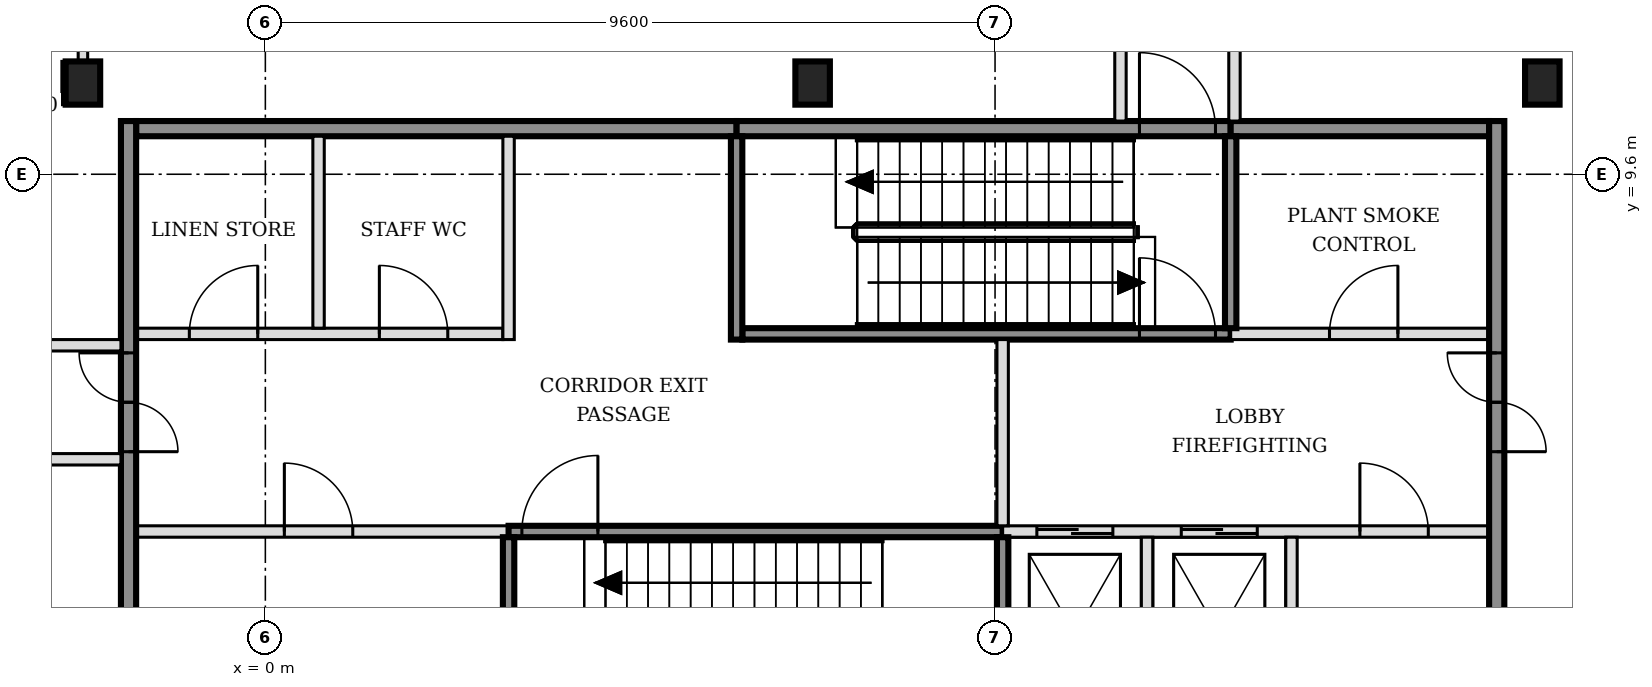
"""IFC4 building model, lengths in metres.
Left out: names, types, materials, properties, quantities, classifications, styles, units other than length and angle.
Written with IfcOpenShell. Run it as: python <this file> out.ifc"""

import sys

from ifc_helpers import new_model, si_unit, direction, frame, frame_2d, origin, origin_2d, place, context, subcontext, project, spatial, polyline, rectangle, i_section, outline, extrude, element, fill, save


model = new_model("IFC4")
c1 = context("Model", 3, precision=1e-05, world=origin(), true_north=direction((0.0, 1.0)))
c2 = subcontext(c1, "Body", "Model", "MODEL_VIEW")
j1 = project(units=[si_unit("LENGTHUNIT", "METRE"), si_unit("PLANEANGLEUNIT", "RADIAN")], contexts=[c1])
p1 = place(None, origin())
s1 = spatial("IfcSite", under=j1, at=p1, CompositionType="ELEMENT")
p2 = place(p1, origin())
s2 = spatial("IfcBuilding", under=s1, at=p2, CompositionType="ELEMENT")
p3 = place(p2, origin())
s3 = spatial("IfcBuildingStorey", under=s2, at=p3, CompositionType="ELEMENT", Elevation=0.0)
for number, where, z_axis, x_axis in (
    (1, (-2.4, 10.8, -0.25), (0.0, 0.0, 1.0), (1.0, 0.0, 0.0)),
    (2, (7.2, 10.8, -0.25), (0.0, 0.0, 1.0), (1.0, 0.0, 0.0)),
    (3, (16.8, 10.8, -0.25), (0.0, 0.0, 1.0), (1.0, 0.0, 0.0)),
):
    element("IfcColumn", number, at=place(p3, frame(where, z_axis=z_axis, x_axis=x_axis)), inside=s3, PredefinedType="COLUMN", context=c2, shape_type="SweptSolid", body=[
        extrude(i_section(OverallWidth=0.454, OverallDepth=0.569, WebThickness=0.078, FlangeThickness=0.125, FilletRadius=0.015, at=origin_2d()), origin(), (0.0, 0.0, 1.0), 9.05),
    ])
p4 = place(p3, frame((-1.7, 4.9, 0.0), z_axis=(0.0, 0.0, 1.0), x_axis=(1.0, 0.0, 0.0)))
e4 = element("IfcWall", 4, at=p4, inside=s3, PredefinedType="SOLIDWALL", context=c2, shape_type="SweptSolid", body=[
    extrude(rectangle(XDim=4.9, YDim=0.15, at=frame_2d((2.45, 0.0))), origin(), (0.0, 0.0, 1.0), 8.8),
])
p5 = place(p4, frame((1.95, 0.0, 0.0)))
e5 = element("IfcOpeningElement", 5, at=p5, cuts=e4, PredefinedType="OPENING", context=c2, shape_type="SweptSolid", body=[
    extrude(rectangle(XDim=0.9, YDim=2.1, at=frame_2d((0.45, 1.05))), frame((0.0, 0.085, 0.0), z_axis=(0.0, -1.0, 0.0), x_axis=(1.0, 0.0, 0.0)), (0.0, 0.0, 1.0), 0.17),
])
p6 = place(p3, frame((3.2, 4.9, 0.0), z_axis=(0.0, 0.0, 1.0), x_axis=(1.0, 0.0, 0.0)))
e6 = element("IfcWall", 6, at=p6, inside=s3, PredefinedType="SOLIDWALL", context=c2, shape_type="SweptSolid", body=[
    extrude(rectangle(XDim=6.5, YDim=0.15, at=frame_2d((3.25, 0.0))), origin(), (0.0, 0.0, 1.0), 8.8),
])
p7 = place(p6, frame((0.175, 0.0, 0.0)))
e7 = element("IfcOpeningElement", 7, at=p7, cuts=e6, PredefinedType="OPENING", context=c2, shape_type="SweptSolid", body=[
    extrude(rectangle(XDim=1.0, YDim=2.1, at=frame_2d((0.5, 1.05))), frame((0.0, 0.085, 0.0), z_axis=(0.0, -1.0, 0.0), x_axis=(1.0, 0.0, 0.0)), (0.0, 0.0, 1.0), 0.17),
])
p8 = place(p3, frame((9.7, 4.9, 0.0), z_axis=(0.0, 0.0, 1.0), x_axis=(1.0, 0.0, 0.0)))
e8 = element("IfcWall", 8, at=p8, inside=s3, PredefinedType="SOLIDWALL", context=c2, shape_type="SweptSolid", body=[
    extrude(rectangle(XDim=6.4, YDim=0.15, at=frame_2d((3.2, 0.0))), origin(), (0.0, 0.0, 1.0), 8.8),
])
p9 = place(p8, frame((0.45, 0.0, 0.0)))
e9 = element("IfcOpeningElement", 9, at=p9, cuts=e8, PredefinedType="OPENING", context=c2, shape_type="SweptSolid", body=[
    extrude(rectangle(XDim=1.0, YDim=2.1, at=frame_2d((0.5, 1.05))), frame((0.0, 0.085, 0.0), z_axis=(0.0, -1.0, 0.0), x_axis=(1.0, 0.0, 0.0)), (0.0, 0.0, 1.0), 0.17),
])
p10 = place(p8, frame((2.35, 0.0, 0.0)))
e10 = element("IfcOpeningElement", 10, at=p10, cuts=e8, PredefinedType="OPENING", context=c2, shape_type="SweptSolid", body=[
    extrude(rectangle(XDim=1.0, YDim=2.1, at=frame_2d((0.5, 1.05))), frame((0.0, 0.085, 0.0), z_axis=(0.0, -1.0, 0.0), x_axis=(1.0, 0.0, 0.0)), (0.0, 0.0, 1.0), 0.17),
])
p11 = place(p8, frame((4.7, 0.0, 0.0)))
e11 = element("IfcOpeningElement", 11, at=p11, cuts=e8, PredefinedType="OPENING", context=c2, shape_type="SweptSolid", body=[
    extrude(rectangle(XDim=0.9, YDim=2.1, at=frame_2d((0.45, 1.05))), frame((0.0, 0.085, 0.0), z_axis=(0.0, -1.0, 0.0), x_axis=(1.0, 0.0, 0.0)), (0.0, 0.0, 1.0), 0.17),
])
p12 = place(p3, frame((-1.7, 7.5, 0.0), z_axis=(0.0, 0.0, 1.0), x_axis=(1.0, 0.0, 0.0)))
e12 = element("IfcWall", 12, at=p12, inside=s3, PredefinedType="SOLIDWALL", context=c2, shape_type="SweptSolid", body=[
    extrude(rectangle(XDim=4.825, YDim=0.15, at=frame_2d((2.413, 0.0))), origin(), (0.0, 0.0, 1.0), 8.8),
])
p13 = place(p12, frame((0.7, 0.0, 0.0)))
e13 = element("IfcOpeningElement", 13, at=p13, cuts=e12, PredefinedType="OPENING", context=c2, shape_type="SweptSolid", body=[
    extrude(rectangle(XDim=0.9, YDim=2.1, at=frame_2d((0.45, 1.05))), frame((0.0, 0.085, 0.0), z_axis=(0.0, -1.0, 0.0), x_axis=(1.0, 0.0, 0.0)), (0.0, 0.0, 1.0), 0.17),
])
p14 = place(p12, frame((3.2, 0.0, 0.0)))
e14 = element("IfcOpeningElement", 14, at=p14, cuts=e12, PredefinedType="OPENING", context=c2, shape_type="SweptSolid", body=[
    extrude(rectangle(XDim=0.9, YDim=2.1, at=frame_2d((0.45, 1.05))), frame((0.0, 0.085, 0.0), z_axis=(0.0, -1.0, 0.0), x_axis=(1.0, 0.0, 0.0)), (0.0, 0.0, 1.0), 0.17),
])
p15 = place(p3, frame((6.275, 7.5, 0.0), z_axis=(0.0, 0.0, 1.0), x_axis=(1.0, 0.0, 0.0)))
e15 = element("IfcWall", 15, at=p15, inside=s3, PredefinedType="SOLIDWALL", context=c2, shape_type="SweptSolid", body=[
    extrude(rectangle(XDim=6.425, YDim=0.15, at=frame_2d((3.212, 0.0))), origin(), (0.0, 0.0, 1.0), 8.8),
])
p16 = place(p15, frame((5.225, 0.0, 0.0)))
e16 = element("IfcOpeningElement", 16, at=p16, cuts=e15, PredefinedType="OPENING", context=c2, shape_type="SweptSolid", body=[
    extrude(rectangle(XDim=1.0, YDim=2.1, at=frame_2d((0.5, 1.05))), frame((0.0, 0.085, 0.0), z_axis=(0.0, -1.0, 0.0), x_axis=(1.0, 0.0, 0.0)), (0.0, 0.0, 1.0), 0.17),
])
p17 = place(p3, frame((12.7, 7.5, 0.0), z_axis=(0.0, 0.0, 1.0), x_axis=(1.0, 0.0, 0.0)))
e17 = element("IfcWall", 17, at=p17, inside=s3, PredefinedType="SOLIDWALL", context=c2, shape_type="SweptSolid", body=[
    extrude(rectangle(XDim=3.4, YDim=0.15, at=frame_2d((1.7, 0.0))), origin(), (0.0, 0.0, 1.0), 8.8),
])
p18 = place(p17, frame((1.3, 0.0, 0.0)))
e18 = element("IfcOpeningElement", 18, at=p18, cuts=e17, PredefinedType="OPENING", context=c2, shape_type="SweptSolid", body=[
    extrude(rectangle(XDim=0.9, YDim=2.1, at=frame_2d((0.45, 1.05))), frame((0.0, 0.085, 0.0), z_axis=(0.0, -1.0, 0.0), x_axis=(1.0, 0.0, 0.0)), (0.0, 0.0, 1.0), 0.17),
])
p19 = place(p3, frame((-1.7, 10.2, 0.0), z_axis=(0.0, 0.0, 1.0), x_axis=(1.0, 0.0, 0.0)))
e19 = element("IfcWall", 19, at=p19, inside=s3, PredefinedType="SOLIDWALL", context=c2, shape_type="SweptSolid", body=[
    extrude(rectangle(XDim=7.9, YDim=0.2, at=frame_2d((3.95, 0.0))), origin(), (0.0, 0.0, 1.0), 8.8),
])
p20 = place(p3, frame((6.2, 10.2, 0.0), z_axis=(0.0, 0.0, 1.0), x_axis=(1.0, 0.0, 0.0)))
e20 = element("IfcWall", 20, at=p20, inside=s3, PredefinedType="SOLIDWALL", context=c2, shape_type="SweptSolid", body=[
    extrude(rectangle(XDim=6.5, YDim=0.2, at=frame_2d((3.25, 0.0))), origin(), (0.0, 0.0, 1.0), 8.8),
])
p21 = place(p20, frame((5.3, 0.0, 0.0)))
e21 = element("IfcOpeningElement", 21, at=p21, cuts=e20, PredefinedType="OPENING", context=c2, shape_type="SweptSolid", body=[
    extrude(rectangle(XDim=1.0, YDim=2.1, at=frame_2d((0.5, 1.05))), frame((0.0, 0.11, 0.0), z_axis=(0.0, -1.0, 0.0), x_axis=(1.0, 0.0, 0.0)), (0.0, 0.0, 1.0), 0.22),
])
p22 = place(p3, frame((12.7, 10.2, 0.0), z_axis=(0.0, 0.0, 1.0), x_axis=(1.0, 0.0, 0.0)))
e22 = element("IfcWall", 22, at=p22, inside=s3, PredefinedType="SOLIDWALL", context=c2, shape_type="SweptSolid", body=[
    extrude(rectangle(XDim=3.4, YDim=0.2, at=frame_2d((1.7, 0.0))), origin(), (0.0, 0.0, 1.0), 8.8),
])
p23 = place(p3, frame((-1.8, -5.5, 0.0), z_axis=(0.0, 0.0, 1.0), x_axis=(0.0, 1.0, 0.0)))
e23 = element("IfcWall", 23, at=p23, inside=s3, PredefinedType="SOLIDWALL", context=c2, shape_type="SweptSolid", body=[
    extrude(rectangle(XDim=15.8, YDim=0.2, at=frame_2d((7.9, 0.0))), origin(), (0.0, 0.0, 1.0), 8.8),
])
p24 = place(p23, frame((3.05, 0.0, 0.0)))
e24 = element("IfcOpeningElement", 24, at=p24, cuts=e23, PredefinedType="OPENING", context=c2, shape_type="SweptSolid", body=[
    extrude(rectangle(XDim=1.3, YDim=2.1, at=frame_2d((0.65, 1.05))), frame((0.0, 0.11, 0.0), z_axis=(0.0, -1.0, 0.0), x_axis=(1.0, 0.0, 0.0)), (0.0, 0.0, 1.0), 0.22),
])
p25 = place(p23, frame((11.45, 0.0, 0.0)))
e25 = element("IfcOpeningElement", 25, at=p25, cuts=e23, PredefinedType="OPENING", context=c2, shape_type="SweptSolid", body=[
    extrude(rectangle(XDim=1.3, YDim=2.1, at=frame_2d((0.65, 1.05))), frame((0.0, 0.11, 0.0), z_axis=(0.0, -1.0, 0.0), x_axis=(1.0, 0.0, 0.0)), (0.0, 0.0, 1.0), 0.22),
])
p26 = place(p3, frame((0.7, 7.575, 0.0), z_axis=(0.0, 0.0, 1.0), x_axis=(0.0, 1.0, 0.0)))
e26 = element("IfcWall", 26, at=p26, inside=s3, PredefinedType="PARTITIONING", context=c2, shape_type="SweptSolid", body=[
    extrude(rectangle(XDim=2.525, YDim=0.15, at=frame_2d((1.263, 0.0))), origin(), (0.0, 0.0, 1.0), 8.8),
])
p27 = place(p3, frame((3.2, 2.275, 0.0), z_axis=(0.0, 0.0, 1.0), x_axis=(0.0, 1.0, 0.0)))
e27 = element("IfcWall", 27, at=p27, inside=s3, PredefinedType="SOLIDWALL", context=c2, shape_type="SweptSolid", body=[
    extrude(rectangle(XDim=2.55, YDim=0.15, at=frame_2d((1.275, 0.0))), origin(), (0.0, 0.0, 1.0), 8.8),
])
for number, where, z_axis, x_axis in (
    (28, (3.2, 7.425, 0.0), (0.0, 0.0, 1.0), (0.0, 1.0, 0.0)),
    (29, (6.2, 7.425, 0.0), (0.0, 0.0, 1.0), (0.0, 1.0, 0.0)),
):
    element("IfcWall", number, at=place(p3, frame(where, z_axis=z_axis, x_axis=x_axis)), inside=s3, PredefinedType="SOLIDWALL", context=c2, shape_type="SweptSolid", body=[
        extrude(rectangle(XDim=2.675, YDim=0.15, at=frame_2d((1.337, 0.0))), origin(), (0.0, 0.0, 1.0), 8.8),
    ])
p28 = place(p3, frame((9.7, 2.275, 0.0), z_axis=(0.0, 0.0, 1.0), x_axis=(0.0, 1.0, 0.0)))
e30 = element("IfcWall", 30, at=p28, inside=s3, PredefinedType="SOLIDWALL", context=c2, shape_type="SweptSolid", body=[
    extrude(rectangle(XDim=2.55, YDim=0.15, at=frame_2d((1.275, 0.0))), origin(), (0.0, 0.0, 1.0), 8.8),
])
p29 = place(p3, frame((9.7, 4.975, 0.0), z_axis=(0.0, 0.0, 1.0), x_axis=(0.0, 1.0, 0.0)))
e31 = element("IfcWall", 31, at=p29, inside=s3, PredefinedType="SOLIDWALL", context=c2, shape_type="SweptSolid", body=[
    extrude(rectangle(XDim=2.45, YDim=0.15, at=frame_2d((1.225, 0.0))), origin(), (0.0, 0.0, 1.0), 8.8),
])
p30 = place(p3, frame((11.6, 2.275, 0.0), z_axis=(0.0, 0.0, 1.0), x_axis=(0.0, 1.0, 0.0)))
e32 = element("IfcWall", 32, at=p30, inside=s3, PredefinedType="SOLIDWALL", context=c2, shape_type="SweptSolid", body=[
    extrude(rectangle(XDim=2.55, YDim=0.15, at=frame_2d((1.275, 0.0))), origin(), (0.0, 0.0, 1.0), 8.8),
])
p31 = place(p3, frame((12.7, 7.575, 0.0), z_axis=(0.0, 0.0, 1.0), x_axis=(0.0, 1.0, 0.0)))
e33 = element("IfcWall", 33, at=p31, inside=s3, PredefinedType="SOLIDWALL", context=c2, shape_type="SweptSolid", body=[
    extrude(rectangle(XDim=2.525, YDim=0.15, at=frame_2d((1.263, 0.0))), origin(), (0.0, 0.0, 1.0), 8.8),
])
p32 = place(p3, frame((13.5, 2.275, 0.0), z_axis=(0.0, 0.0, 1.0), x_axis=(0.0, 1.0, 0.0)))
e34 = element("IfcWall", 34, at=p32, inside=s3, PredefinedType="SOLIDWALL", context=c2, shape_type="SweptSolid", body=[
    extrude(rectangle(XDim=2.55, YDim=0.15, at=frame_2d((1.275, 0.0))), origin(), (0.0, 0.0, 1.0), 8.8),
])
p33 = place(p3, frame((16.2, -5.5, 0.0), z_axis=(0.0, 0.0, 1.0), x_axis=(0.0, 1.0, 0.0)))
e35 = element("IfcWall", 35, at=p33, inside=s3, PredefinedType="SOLIDWALL", context=c2, shape_type="SweptSolid", body=[
    extrude(rectangle(XDim=15.8, YDim=0.2, at=frame_2d((7.9, 0.0))), origin(), (0.0, 0.0, 1.0), 8.8),
])
p34 = place(p33, frame((3.05, 0.0, 0.0)))
e36 = element("IfcOpeningElement", 36, at=p34, cuts=e35, PredefinedType="OPENING", context=c2, shape_type="SweptSolid", body=[
    extrude(rectangle(XDim=1.3, YDim=2.1, at=frame_2d((0.65, 1.05))), frame((0.0, 0.11, 0.0), z_axis=(0.0, -1.0, 0.0), x_axis=(1.0, 0.0, 0.0)), (0.0, 0.0, 1.0), 0.22),
])
p35 = place(p33, frame((11.45, 0.0, 0.0)))
e37 = element("IfcOpeningElement", 37, at=p35, cuts=e35, PredefinedType="OPENING", context=c2, shape_type="SweptSolid", body=[
    extrude(rectangle(XDim=1.3, YDim=2.1, at=frame_2d((0.65, 1.05))), frame((0.0, 0.11, 0.0), z_axis=(0.0, -1.0, 0.0), x_axis=(1.0, 0.0, 0.0)), (0.0, 0.0, 1.0), 0.22),
])
for number, where, z_axis, x_axis in (
    (38, (11.25, 10.3, 0.0), (0.0, 0.0, 1.0), (0.0, 1.0, 0.0)),
    (39, (12.75, 10.3, 0.0), (0.0, 0.0, 1.0), (0.0, 1.0, 0.0)),
):
    element("IfcWall", number, at=place(p3, frame(where, z_axis=z_axis, x_axis=x_axis)), inside=s3, PredefinedType="SOLIDWALL", context=c2, shape_type="SweptSolid", body=[
        extrude(rectangle(XDim=13.6, YDim=0.15, at=frame_2d((6.8, 0.0))), origin(), (0.0, 0.0, 1.0), 8.8),
    ])
for number, where, z_axis, x_axis in (
    (40, (-33.5, 5.85, 0.0), (0.0, 0.0, 1.0), (1.0, 0.0, 0.0)),
    (41, (-33.5, 7.35, 0.0), (0.0, 0.0, 1.0), (1.0, 0.0, 0.0)),
):
    element("IfcWall", number, at=place(p3, frame(where, z_axis=z_axis, x_axis=x_axis)), inside=s3, PredefinedType="SOLIDWALL", context=c2, shape_type="SweptSolid", body=[
        extrude(rectangle(XDim=31.6, YDim=0.15, at=frame_2d((15.8, 0.0))), origin(), (0.0, 0.0, 1.0), 8.8),
    ])
p36 = place(p3, frame((-2.4, 11.084, 0.0), z_axis=(0.0, 0.0, 1.0), x_axis=(0.0, 1.0, 0.0)))
e42 = element("IfcWall", 42, at=p36, inside=s3, PredefinedType="PARTITIONING", context=c2, shape_type="SweptSolid", body=[
    extrude(outline(polyline([(0.0, 0.0), (3.853, 0.0), (3.853, 8.8), (2.265, 8.8), (2.263, 8.08), (1.966, 8.08), (1.963, 8.8), (0.0, 8.8), (0.0, 0.0)])), frame((0.0, 0.062, 0.0), z_axis=(0.0, -1.0, 0.0), x_axis=(1.0, 0.0, 0.0)), (0.0, 0.0, 1.0), 0.125),
])
p37 = place(p3, frame((-2.652, 10.515, 0.0), z_axis=(0.0, 0.0, 1.0), x_axis=(0.0, 1.0, 0.0)))
e43 = element("IfcWall", 43, at=p37, inside=s3, PredefinedType="PARTITIONING", context=c2, shape_type="SweptSolid", body=[
    extrude(rectangle(XDim=0.569, YDim=0.05, at=frame_2d((0.285, 0.0))), origin(), (0.0, 0.0, 1.0), 8.8),
])
p38 = place(p9, origin())
e44 = element("IfcDoor", 44, at=p38, inside=s3, OperationType="DOUBLE_DOOR_SLIDING", PredefinedType="DOOR", context=c2, shape_type="SweptSolid", body=[
    extrude(rectangle(XDim=1.0, YDim=2.1, at=frame_2d((0.5, 1.05))), frame((0.0, 0.025, 0.0), z_axis=(0.0, -1.0, 0.0), x_axis=(1.0, 0.0, 0.0)), (0.0, 0.0, 1.0), 0.05),
])
fill(e9, e44)
p39 = place(p10, origin())
e45 = element("IfcDoor", 45, at=p39, inside=s3, OperationType="DOUBLE_DOOR_SLIDING", PredefinedType="DOOR", context=c2, shape_type="SweptSolid", body=[
    extrude(rectangle(XDim=1.0, YDim=2.1, at=frame_2d((0.5, 1.05))), frame((0.0, 0.025, 0.0), z_axis=(0.0, -1.0, 0.0), x_axis=(1.0, 0.0, 0.0)), (0.0, 0.0, 1.0), 0.05),
])
fill(e10, e45)
p40 = place(p7, origin())
e46 = element("IfcDoor", 46, at=p40, inside=s3, OperationType="SINGLE_SWING_RIGHT", PredefinedType="DOOR", context=c2, shape_type="SweptSolid", body=[
    extrude(rectangle(XDim=1.0, YDim=2.1, at=frame_2d((0.5, 1.05))), frame((0.0, 0.025, 0.0), z_axis=(0.0, -1.0, 0.0), x_axis=(1.0, 0.0, 0.0)), (0.0, 0.0, 1.0), 0.05),
])
fill(e7, e46)
p41 = place(p16, origin())
e47 = element("IfcDoor", 47, at=p41, inside=s3, OperationType="SINGLE_SWING_LEFT", PredefinedType="DOOR", context=c2, shape_type="SweptSolid", body=[
    extrude(rectangle(XDim=1.0, YDim=2.1, at=frame_2d((0.5, 1.05))), frame((0.0, 0.025, 0.0), z_axis=(0.0, -1.0, 0.0), x_axis=(1.0, 0.0, 0.0)), (0.0, 0.0, 1.0), 0.05),
])
fill(e16, e47)
p42 = place(p21, origin())
e48 = element("IfcDoor", 48, at=p42, inside=s3, OperationType="SINGLE_SWING_LEFT", PredefinedType="DOOR", context=c2, shape_type="SweptSolid", body=[
    extrude(rectangle(XDim=1.0, YDim=2.1, at=frame_2d((0.5, 1.05))), frame((0.0, 0.025, 0.0), z_axis=(0.0, -1.0, 0.0), x_axis=(1.0, 0.0, 0.0)), (0.0, 0.0, 1.0), 0.05),
])
fill(e21, e48)
p43 = place(p25, origin())
e49 = element("IfcDoor", 49, at=p43, inside=s3, OperationType="DOUBLE_DOOR_SINGLE_SWING", PredefinedType="DOOR", context=c2, shape_type="SweptSolid", body=[
    extrude(rectangle(XDim=1.3, YDim=2.1, at=frame_2d((0.65, 1.05))), frame((0.0, 0.025, 0.0), z_axis=(0.0, -1.0, 0.0), x_axis=(1.0, 0.0, 0.0)), (0.0, 0.0, 1.0), 0.05),
])
fill(e25, e49)
p44 = place(p35, origin())
e50 = element("IfcDoor", 50, at=p44, inside=s3, OperationType="DOUBLE_DOOR_SINGLE_SWING", PredefinedType="DOOR", context=c2, shape_type="SweptSolid", body=[
    extrude(rectangle(XDim=1.3, YDim=2.1, at=frame_2d((0.65, 1.05))), frame((0.0, 0.025, 0.0), z_axis=(0.0, -1.0, 0.0), x_axis=(1.0, 0.0, 0.0)), (0.0, 0.0, 1.0), 0.05),
])
fill(e37, e50)
p45 = place(p11, origin())
e51 = element("IfcDoor", 51, at=p45, inside=s3, OperationType="SINGLE_SWING_LEFT", PredefinedType="DOOR", context=c2, shape_type="SweptSolid", body=[
    extrude(rectangle(XDim=0.9, YDim=2.1, at=frame_2d((0.45, 1.05))), frame((0.0, 0.025, 0.0), z_axis=(0.0, -1.0, 0.0), x_axis=(1.0, 0.0, 0.0)), (0.0, 0.0, 1.0), 0.05),
])
fill(e11, e51)
p46 = place(p18, origin())
e52 = element("IfcDoor", 52, at=p46, inside=s3, OperationType="SINGLE_SWING_RIGHT", PredefinedType="DOOR", context=c2, shape_type="SweptSolid", body=[
    extrude(rectangle(XDim=0.9, YDim=2.1, at=frame_2d((0.45, 1.05))), frame((0.0, 0.025, 0.0), z_axis=(0.0, -1.0, 0.0), x_axis=(1.0, 0.0, 0.0)), (0.0, 0.0, 1.0), 0.05),
])
fill(e18, e52)
p47 = place(p5, origin())
e53 = element("IfcDoor", 53, at=p47, inside=s3, OperationType="SINGLE_SWING_LEFT", PredefinedType="DOOR", context=c2, shape_type="SweptSolid", body=[
    extrude(rectangle(XDim=0.9, YDim=2.1, at=frame_2d((0.45, 1.05))), frame((0.0, 0.025, 0.0), z_axis=(0.0, -1.0, 0.0), x_axis=(1.0, 0.0, 0.0)), (0.0, 0.0, 1.0), 0.05),
])
fill(e5, e53)
p48 = place(p13, origin())
e54 = element("IfcDoor", 54, at=p48, inside=s3, OperationType="SINGLE_SWING_RIGHT", PredefinedType="DOOR", context=c2, shape_type="SweptSolid", body=[
    extrude(rectangle(XDim=0.9, YDim=2.1, at=frame_2d((0.45, 1.05))), frame((0.0, 0.025, 0.0), z_axis=(0.0, -1.0, 0.0), x_axis=(1.0, 0.0, 0.0)), (0.0, 0.0, 1.0), 0.05),
])
fill(e13, e54)
p49 = place(p14, origin())
e55 = element("IfcDoor", 55, at=p49, inside=s3, OperationType="SINGLE_SWING_LEFT", PredefinedType="DOOR", context=c2, shape_type="SweptSolid", body=[
    extrude(rectangle(XDim=0.9, YDim=2.1, at=frame_2d((0.45, 1.05))), frame((0.0, 0.025, 0.0), z_axis=(0.0, -1.0, 0.0), x_axis=(1.0, 0.0, 0.0)), (0.0, 0.0, 1.0), 0.05),
])
fill(e14, e55)
save(model, sys.argv[1])
